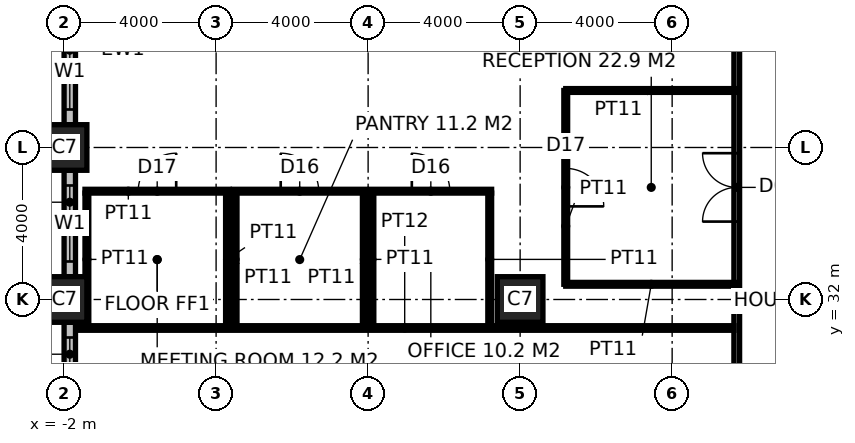
"""IFC4 building model, lengths in metres.
Left out: names, types, materials, properties, quantities, classifications, styles, units other than length and angle.
Written with IfcOpenShell. Run it as: python <this file> out.ifc"""

import sys

from ifc_helpers import new_model, si_unit, direction, frame, frame_2d, origin, origin_2d, place, context, subcontext, project, spatial, rectangle, hollow_rectangle, extrude, element, fill, save


model = new_model("IFC4")
c1 = context("Model", 3, precision=1e-05, world=origin(), true_north=direction((0.0, 1.0)))
c2 = subcontext(c1, "Body", "Model", "MODEL_VIEW")
j1 = project(units=[si_unit("LENGTHUNIT", "METRE"), si_unit("PLANEANGLEUNIT", "RADIAN")], contexts=[c1])
p1 = place(None, origin())
s1 = spatial("IfcSite", under=j1, at=p1, CompositionType="ELEMENT")
p2 = place(p1, origin())
s2 = spatial("IfcBuilding", under=s1, at=p2, CompositionType="ELEMENT")
p3 = place(p2, frame((0.0, 0.0, 59.0)))
s3 = spatial("IfcBuildingStorey", under=s2, at=p3, CompositionType="ELEMENT", Elevation=59.0)
for number, where, z_axis, x_axis in (
    (1, (-2.0, 32.0, 0.0), (0.0, 0.0, 1.0), (1.0, 0.0, 0.0)),
    (2, (-2.0, 36.0, 0.0), (0.0, 0.0, 1.0), (1.0, 0.0, 0.0)),
    (3, (10.0, 32.0, 0.0), (0.0, 0.0, 1.0), (1.0, 0.0, 0.0)),
):
    element("IfcColumn", number, at=place(p3, frame(where, z_axis=z_axis, x_axis=x_axis)), inside=s3, PredefinedType="COLUMN", context=c2, shape_type="SweptSolid", body=[
        extrude(hollow_rectangle(XDim=1.2, YDim=1.2, WallThickness=0.1, at=origin_2d()), origin(), (0.0, 0.0, 1.0), 4.0),
    ])
p4 = place(p3, frame((15.7, 14.625, 0.0), z_axis=(0.0, 0.0, 1.0), x_axis=(0.0, 1.0, 0.0)))
e4 = element("IfcWall", 4, at=p4, inside=s3, PredefinedType="PARTITIONING", context=c2, shape_type="SweptSolid", body=[
    extrude(rectangle(XDim=24.15, YDim=0.15, at=frame_2d((12.075, 0.0))), origin(), (0.0, 0.0, 1.0), 3.85),
])
p5 = place(p4, frame((7.475, 0.0, 0.0)))
e5 = element("IfcOpeningElement", 5, at=p5, cuts=e4, PredefinedType="OPENING", context=c2, shape_type="SweptSolid", body=[
    extrude(rectangle(XDim=1.8, YDim=2.4, at=frame_2d((0.9, 1.2))), frame((0.0, 0.085, 0.0), z_axis=(0.0, -1.0, 0.0), x_axis=(1.0, 0.0, 0.0)), (0.0, 0.0, 1.0), 0.17),
])
p6 = place(p4, frame((19.425, 0.0, 0.0)))
e6 = element("IfcOpeningElement", 6, at=p6, cuts=e4, PredefinedType="OPENING", context=c2, shape_type="SweptSolid", body=[
    extrude(rectangle(XDim=1.8, YDim=2.4, at=frame_2d((0.9, 1.2))), frame((0.0, 0.085, 0.0), z_axis=(0.0, -1.0, 0.0), x_axis=(1.0, 0.0, 0.0)), (0.0, 0.0, 1.0), 0.17),
])
p7 = place(p3, frame((-1.7, 31.25, 0.0), z_axis=(0.0, 0.0, 1.0), x_axis=(1.0, 0.0, 0.0)))
e7 = element("IfcWall", 7, at=p7, inside=s3, PredefinedType="PARTITIONING", context=c2, shape_type="SweptSolid", body=[
    extrude(rectangle(XDim=17.325, YDim=0.12, at=frame_2d((8.663, 0.0))), origin(), (0.0, 0.0, 1.0), 3.85),
])
p8 = place(p3, frame((-1.45, 34.85, 0.0), z_axis=(0.0, 0.0, 1.0), x_axis=(1.0, 0.0, 0.0)))
e8 = element("IfcWall", 8, at=p8, inside=s3, PredefinedType="PARTITIONING", context=c2, shape_type="SweptSolid", body=[
    extrude(rectangle(XDim=3.8, YDim=0.1, at=frame_2d((1.9, 0.0))), origin(), (0.0, 0.0, 1.0), 3.85),
])
p9 = place(p8, frame((1.4, 0.0, 0.0)))
e9 = element("IfcOpeningElement", 9, at=p9, cuts=e8, PredefinedType="OPENING", context=c2, shape_type="SweptSolid", body=[
    extrude(rectangle(XDim=1.0, YDim=2.2, at=frame_2d((0.5, 1.1))), frame((0.0, 0.06, 0.0), z_axis=(0.0, -1.0, 0.0), x_axis=(1.0, 0.0, 0.0)), (0.0, 0.0, 1.0), 0.12),
])
p10 = place(p3, frame((2.45, 34.85, 0.0), z_axis=(0.0, 0.0, 1.0), x_axis=(1.0, 0.0, 0.0)))
e10 = element("IfcWall", 10, at=p10, inside=s3, PredefinedType="PARTITIONING", context=c2, shape_type="SweptSolid", body=[
    extrude(rectangle(XDim=3.5, YDim=0.1, at=frame_2d((1.75, 0.0))), origin(), (0.0, 0.0, 1.0), 3.85),
])
p11 = place(p10, frame((1.25, 0.0, 0.0)))
e11 = element("IfcOpeningElement", 11, at=p11, cuts=e10, PredefinedType="OPENING", context=c2, shape_type="SweptSolid", body=[
    extrude(rectangle(XDim=1.0, YDim=2.2, at=frame_2d((0.5, 1.1))), frame((0.0, 0.06, 0.0), z_axis=(0.0, -1.0, 0.0), x_axis=(1.0, 0.0, 0.0)), (0.0, 0.0, 1.0), 0.12),
])
p12 = place(p3, frame((6.05, 34.85, 0.0), z_axis=(0.0, 0.0, 1.0), x_axis=(1.0, 0.0, 0.0)))
e12 = element("IfcWall", 12, at=p12, inside=s3, PredefinedType="PARTITIONING", context=c2, shape_type="SweptSolid", body=[
    extrude(rectangle(XDim=3.2, YDim=0.1, at=frame_2d((1.6, 0.0))), origin(), (0.0, 0.0, 1.0), 3.85),
])
p13 = place(p12, frame((1.1, 0.0, 0.0)))
e13 = element("IfcOpeningElement", 13, at=p13, cuts=e12, PredefinedType="OPENING", context=c2, shape_type="SweptSolid", body=[
    extrude(rectangle(XDim=1.0, YDim=2.2, at=frame_2d((0.5, 1.1))), frame((0.0, 0.06, 0.0), z_axis=(0.0, -1.0, 0.0), x_axis=(1.0, 0.0, 0.0)), (0.0, 0.0, 1.0), 0.12),
])
for number, where, z_axis, x_axis in (
    (14, (-1.4, 31.31, 0.0), (0.0, 0.0, 1.0), (0.0, 1.0, 0.0)),
    (15, (2.3, 31.31, 0.0), (0.0, 0.0, 1.0), (0.0, 1.0, 0.0)),
    (16, (2.5, 31.31, 0.0), (0.0, 0.0, 1.0), (0.0, 1.0, 0.0)),
    (17, (5.9, 31.31, 0.0), (0.0, 0.0, 1.0), (0.0, 1.0, 0.0)),
    (18, (6.1, 31.31, 0.0), (0.0, 0.0, 1.0), (0.0, 1.0, 0.0)),
    (19, (9.2, 31.31, 0.0), (0.0, 0.0, 1.0), (0.0, 1.0, 0.0)),
):
    element("IfcWall", number, at=place(p3, frame(where, z_axis=z_axis, x_axis=x_axis)), inside=s3, PredefinedType="PARTITIONING", context=c2, shape_type="SweptSolid", body=[
        extrude(rectangle(XDim=3.49, YDim=0.1, at=frame_2d((1.745, 0.0))), origin(), (0.0, 0.0, 1.0), 3.85),
    ])
p14 = place(p3, frame((15.7, 37.5, 0.0), z_axis=(0.0, 0.0, 1.0), x_axis=(-1.0, 0.0, 0.0)))
e20 = element("IfcWall", 20, at=p14, inside=s3, PredefinedType="PARTITIONING", context=c2, shape_type="SweptSolid", body=[
    extrude(rectangle(XDim=4.5, YDim=0.1, at=frame_2d((2.25, 0.0))), origin(), (0.0, 0.0, 1.0), 3.85),
])
p15 = place(p3, frame((11.2, 37.5, 0.0), z_axis=(0.0, 0.0, 1.0), x_axis=(0.0, -1.0, 0.0)))
e21 = element("IfcWall", 21, at=p15, inside=s3, PredefinedType="PARTITIONING", context=c2, shape_type="SweptSolid", body=[
    extrude(rectangle(XDim=5.1, YDim=0.1, at=frame_2d((2.55, 0.0))), origin(), (0.0, 0.0, 1.0), 3.85),
])
p16 = place(p15, frame((2.05, 0.0, 0.0)))
e22 = element("IfcOpeningElement", 22, at=p16, cuts=e21, PredefinedType="OPENING", context=c2, shape_type="SweptSolid", body=[
    extrude(rectangle(XDim=1.0, YDim=2.2, at=frame_2d((0.5, 1.1))), frame((0.0, 0.06, 0.0), z_axis=(0.0, -1.0, 0.0), x_axis=(1.0, 0.0, 0.0)), (0.0, 0.0, 1.0), 0.12),
])
p17 = place(p3, frame((11.2, 32.4, 0.0), z_axis=(0.0, 0.0, 1.0), x_axis=(1.0, 0.0, 0.0)))
e23 = element("IfcWall", 23, at=p17, inside=s3, PredefinedType="PARTITIONING", context=c2, shape_type="SweptSolid", body=[
    extrude(rectangle(XDim=4.5, YDim=0.1, at=frame_2d((2.25, 0.0))), origin(), (0.0, 0.0, 1.0), 2.95),
])
p18 = place(p3, frame((-1.85, 31.4, 0.0), z_axis=(0.0, 0.0, 1.0), x_axis=(0.0, -1.0, 0.0)))
e24 = element("IfcWall", 24, at=p18, inside=s3, PredefinedType="ELEMENTEDWALL", context=c2, shape_type="SweptSolid", body=[
    extrude(rectangle(XDim=2.8, YDim=0.3, at=frame_2d((1.4, 0.0))), origin(), (0.0, 0.0, 1.0), 2.85),
])
p19 = place(p18, frame((0.4, 0.0, 0.8)))
e25 = element("IfcOpeningElement", 25, at=p19, cuts=e24, PredefinedType="OPENING", context=c2, shape_type="SweptSolid", body=[
    extrude(rectangle(XDim=2.0, YDim=2.0, at=frame_2d((1.0, 1.0))), frame((0.0, 0.16, 0.0), z_axis=(0.0, -1.0, 0.0), x_axis=(1.0, 0.0, 0.0)), (0.0, 0.0, 1.0), 0.32),
])
p20 = place(p3, frame((-1.85, 35.4, 0.0), z_axis=(0.0, 0.0, 1.0), x_axis=(0.0, -1.0, 0.0)))
e26 = element("IfcWall", 26, at=p20, inside=s3, PredefinedType="ELEMENTEDWALL", context=c2, shape_type="SweptSolid", body=[
    extrude(rectangle(XDim=2.8, YDim=0.3, at=frame_2d((1.4, 0.0))), origin(), (0.0, 0.0, 1.0), 2.85),
])
p21 = place(p20, frame((0.4, 0.0, 0.8)))
e27 = element("IfcOpeningElement", 27, at=p21, cuts=e26, PredefinedType="OPENING", context=c2, shape_type="SweptSolid", body=[
    extrude(rectangle(XDim=2.0, YDim=2.0, at=frame_2d((1.0, 1.0))), frame((0.0, 0.16, 0.0), z_axis=(0.0, -1.0, 0.0), x_axis=(1.0, 0.0, 0.0)), (0.0, 0.0, 1.0), 0.32),
])
p22 = place(p3, frame((-1.85, 39.4, 0.0), z_axis=(0.0, 0.0, 1.0), x_axis=(0.0, -1.0, 0.0)))
e28 = element("IfcWall", 28, at=p22, inside=s3, PredefinedType="ELEMENTEDWALL", context=c2, shape_type="SweptSolid", body=[
    extrude(rectangle(XDim=2.8, YDim=0.3, at=frame_2d((1.4, 0.0))), origin(), (0.0, 0.0, 1.0), 2.85),
])
p23 = place(p22, frame((0.4, 0.0, 0.8)))
e29 = element("IfcOpeningElement", 29, at=p23, cuts=e28, PredefinedType="OPENING", context=c2, shape_type="SweptSolid", body=[
    extrude(rectangle(XDim=2.0, YDim=2.0, at=frame_2d((1.0, 1.0))), frame((0.0, 0.16, 0.0), z_axis=(0.0, -1.0, 0.0), x_axis=(1.0, 0.0, 0.0)), (0.0, 0.0, 1.0), 0.32),
])
p24 = place(p6, origin())
e30 = element("IfcDoor", 30, at=p24, inside=s3, OperationType="DOUBLE_DOOR_DOUBLE_SWING", PredefinedType="DOOR", context=c2, shape_type="SweptSolid", body=[
    extrude(rectangle(XDim=1.8, YDim=2.4, at=frame_2d((0.9, 1.2))), frame((0.0, 0.025, 0.0), z_axis=(0.0, -1.0, 0.0), x_axis=(1.0, 0.0, 0.0)), (0.0, 0.0, 1.0), 0.05),
])
fill(e6, e30)
p25 = place(p9, origin())
e31 = element("IfcDoor", 31, at=p25, inside=s3, OperationType="SINGLE_SWING_RIGHT", PredefinedType="DOOR", context=c2, shape_type="SweptSolid", body=[
    extrude(rectangle(XDim=1.0, YDim=2.2, at=frame_2d((0.5, 1.1))), frame((0.0, 0.025, 0.0), z_axis=(0.0, -1.0, 0.0), x_axis=(1.0, 0.0, 0.0)), (0.0, 0.0, 1.0), 0.05),
])
fill(e9, e31)
p26 = place(p11, origin())
e32 = element("IfcDoor", 32, at=p26, inside=s3, OperationType="SINGLE_SWING_LEFT", PredefinedType="DOOR", context=c2, shape_type="SweptSolid", body=[
    extrude(rectangle(XDim=1.0, YDim=2.2, at=frame_2d((0.5, 1.1))), frame((0.0, 0.025, 0.0), z_axis=(0.0, -1.0, 0.0), x_axis=(1.0, 0.0, 0.0)), (0.0, 0.0, 1.0), 0.05),
])
fill(e11, e32)
p27 = place(p13, origin())
e33 = element("IfcDoor", 33, at=p27, inside=s3, OperationType="SINGLE_SWING_LEFT", PredefinedType="DOOR", context=c2, shape_type="SweptSolid", body=[
    extrude(rectangle(XDim=1.0, YDim=2.2, at=frame_2d((0.5, 1.1))), frame((0.0, 0.025, 0.0), z_axis=(0.0, -1.0, 0.0), x_axis=(1.0, 0.0, 0.0)), (0.0, 0.0, 1.0), 0.05),
])
fill(e13, e33)
p28 = place(p16, origin())
e34 = element("IfcDoor", 34, at=p28, inside=s3, OperationType="SINGLE_SWING_RIGHT", PredefinedType="DOOR", context=c2, shape_type="SweptSolid", body=[
    extrude(rectangle(XDim=1.0, YDim=2.2, at=frame_2d((0.5, 1.1))), frame((0.0, 0.025, 0.0), z_axis=(0.0, -1.0, 0.0), x_axis=(1.0, 0.0, 0.0)), (0.0, 0.0, 1.0), 0.05),
])
fill(e22, e34)
p29 = place(p19, origin())
e35 = element("IfcWindow", 35, at=p29, inside=s3, PartitioningType="SINGLE_PANEL", PredefinedType="WINDOW", context=c2, shape_type="SweptSolid", body=[
    extrude(rectangle(XDim=2.0, YDim=2.0, at=frame_2d((1.0, 1.0))), frame((0.0, 0.03, 0.0), z_axis=(0.0, -1.0, 0.0), x_axis=(1.0, 0.0, 0.0)), (0.0, 0.0, 1.0), 0.06),
])
fill(e25, e35)
p30 = place(p21, origin())
e36 = element("IfcWindow", 36, at=p30, inside=s3, PartitioningType="SINGLE_PANEL", PredefinedType="WINDOW", context=c2, shape_type="SweptSolid", body=[
    extrude(rectangle(XDim=2.0, YDim=2.0, at=frame_2d((1.0, 1.0))), frame((0.0, 0.03, 0.0), z_axis=(0.0, -1.0, 0.0), x_axis=(1.0, 0.0, 0.0)), (0.0, 0.0, 1.0), 0.06),
])
fill(e27, e36)
p31 = place(p23, origin())
e37 = element("IfcWindow", 37, at=p31, inside=s3, PartitioningType="SINGLE_PANEL", PredefinedType="WINDOW", context=c2, shape_type="SweptSolid", body=[
    extrude(rectangle(XDim=2.0, YDim=2.0, at=frame_2d((1.0, 1.0))), frame((0.0, 0.03, 0.0), z_axis=(0.0, -1.0, 0.0), x_axis=(1.0, 0.0, 0.0)), (0.0, 0.0, 1.0), 0.06),
])
fill(e29, e37)
save(model, sys.argv[1])
